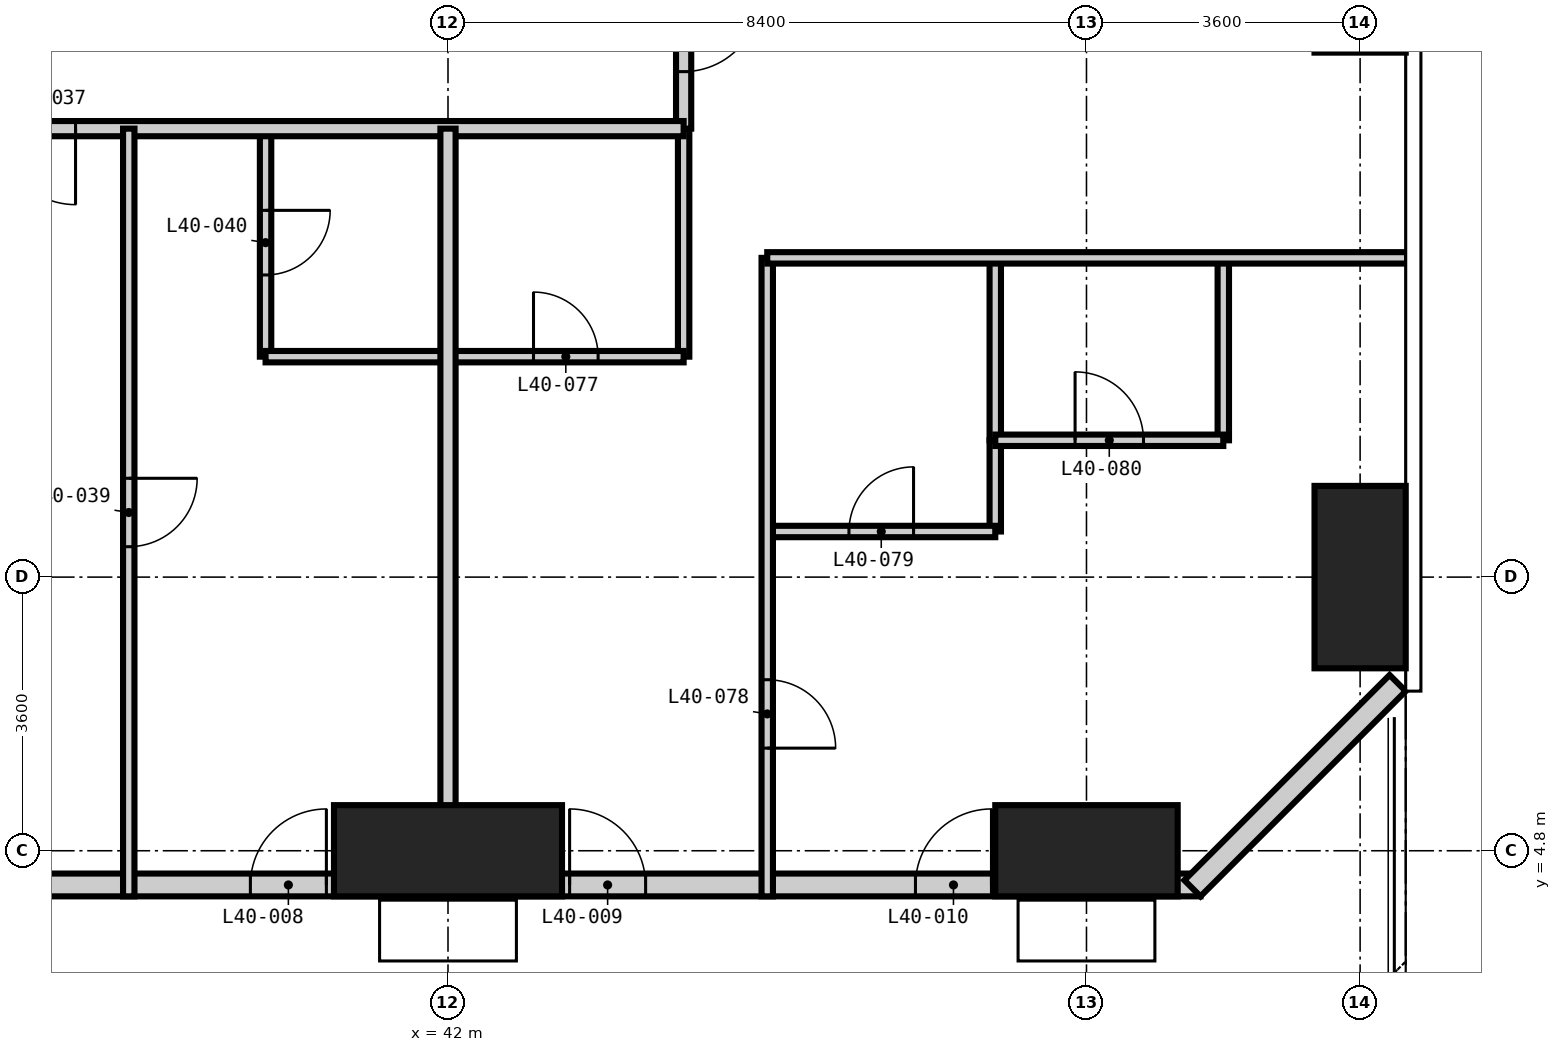
"""IFC4 building model, lengths in metres.
Left out: names, types, materials, properties, quantities, classifications, styles, units other than length and angle.
Written with IfcOpenShell. Run it as: python <this file> out.ifc"""

import sys

from ifc_helpers import new_model, si_unit, direction, frame, frame_2d, origin, origin_2d, place, context, subcontext, project, spatial, rectangle, extrude, element, fill, save


model = new_model("IFC4")
c1 = context("Model", 3, precision=1e-05, world=origin(), true_north=direction((0.0, 1.0)))
c2 = subcontext(c1, "Body", "Model", "MODEL_VIEW")
j1 = project(units=[si_unit("LENGTHUNIT", "METRE"), si_unit("PLANEANGLEUNIT", "RADIAN")], contexts=[c1])
p1 = place(None, origin())
s1 = spatial("IfcSite", under=j1, at=p1, CompositionType="ELEMENT")
p2 = place(p1, origin())
s2 = spatial("IfcBuilding", under=s1, at=p2, CompositionType="ELEMENT")
p3 = place(p2, frame((0.0, 0.0, 159.0)))
s3 = spatial("IfcBuildingStorey", under=s2, at=p3, CompositionType="ELEMENT", Elevation=159.0)
p4 = place(p3, frame((42.0, 4.8, -0.35), z_axis=(0.0, 0.0, 1.0), x_axis=(1.0, 0.0, 0.0)))
e1 = element("IfcColumn", 1, at=p4, inside=s3, PredefinedType="COLUMN", context=c2, shape_type="SweptSolid", body=[
    extrude(rectangle(XDim=3.0, YDim=1.2, at=origin_2d()), origin(), (0.0, 0.0, 1.0), 3.6),
])
p5 = place(p3, frame((50.4, 4.8, -0.35), z_axis=(0.0, 0.0, 1.0), x_axis=(1.0, 0.0, 0.0)))
e2 = element("IfcColumn", 2, at=p5, inside=s3, PredefinedType="COLUMN", context=c2, shape_type="SweptSolid", body=[
    extrude(rectangle(XDim=2.4, YDim=1.2, at=origin_2d()), origin(), (0.0, 0.0, 1.0), 3.6),
])
p6 = place(p3, frame((54.0, 8.4, -0.35), z_axis=(0.0, 0.0, 1.0), x_axis=(1.0, 0.0, 0.0)))
e3 = element("IfcColumn", 3, at=p6, inside=s3, PredefinedType="COLUMN", context=c2, shape_type="SweptSolid", body=[
    extrude(rectangle(XDim=1.2, YDim=2.4, at=origin_2d()), origin(), (0.0, 0.0, 1.0), 3.6),
])
p7 = place(p3, frame((6.9, 4.35, 0.0), z_axis=(0.0, 0.0, 1.0), x_axis=(1.0, 0.0, 0.0)))
e4 = element("IfcWall", 4, at=p7, inside=s3, PredefinedType="SOLIDWALL", context=c2, shape_type="SweptSolid", body=[
    extrude(rectangle(XDim=45.0, YDim=0.3, at=frame_2d((22.5, 0.0))), origin(), (0.0, 0.0, 1.0), 3.25),
])
p8 = place(p7, frame((2.75, 0.0, 0.0)))
e5 = element("IfcOpeningElement", 5, at=p8, cuts=e4, PredefinedType="OPENING", context=c2, shape_type="SweptSolid", body=[
    extrude(rectangle(XDim=1.0, YDim=2.4, at=frame_2d((0.5, 1.2))), frame((0.0, 0.16, 0.0), z_axis=(0.0, -1.0, 0.0), x_axis=(1.0, 0.0, 0.0)), (0.0, 0.0, 1.0), 0.32),
])
p9 = place(p7, frame((7.3, 0.0, 0.0)))
e6 = element("IfcOpeningElement", 6, at=p9, cuts=e4, PredefinedType="OPENING", context=c2, shape_type="SweptSolid", body=[
    extrude(rectangle(XDim=1.0, YDim=2.4, at=frame_2d((0.5, 1.2))), frame((0.0, 0.16, 0.0), z_axis=(0.0, -1.0, 0.0), x_axis=(1.0, 0.0, 0.0)), (0.0, 0.0, 1.0), 0.32),
])
p10 = place(p7, frame((11.5, 0.0, 0.0)))
e7 = element("IfcOpeningElement", 7, at=p10, cuts=e4, PredefinedType="OPENING", context=c2, shape_type="SweptSolid", body=[
    extrude(rectangle(XDim=1.0, YDim=2.4, at=frame_2d((0.5, 1.2))), frame((0.0, 0.16, 0.0), z_axis=(0.0, -1.0, 0.0), x_axis=(1.0, 0.0, 0.0)), (0.0, 0.0, 1.0), 0.32),
])
p11 = place(p7, frame((15.7, 0.0, 0.0)))
e8 = element("IfcOpeningElement", 8, at=p11, cuts=e4, PredefinedType="OPENING", context=c2, shape_type="SweptSolid", body=[
    extrude(rectangle(XDim=1.0, YDim=2.4, at=frame_2d((0.5, 1.2))), frame((0.0, 0.16, 0.0), z_axis=(0.0, -1.0, 0.0), x_axis=(1.0, 0.0, 0.0)), (0.0, 0.0, 1.0), 0.32),
])
p12 = place(p7, frame((19.9, 0.0, 0.0)))
e9 = element("IfcOpeningElement", 9, at=p12, cuts=e4, PredefinedType="OPENING", context=c2, shape_type="SweptSolid", body=[
    extrude(rectangle(XDim=1.0, YDim=2.4, at=frame_2d((0.5, 1.2))), frame((0.0, 0.16, 0.0), z_axis=(0.0, -1.0, 0.0), x_axis=(1.0, 0.0, 0.0)), (0.0, 0.0, 1.0), 0.32),
])
p13 = place(p7, frame((24.1, 0.0, 0.0)))
e10 = element("IfcOpeningElement", 10, at=p13, cuts=e4, PredefinedType="OPENING", context=c2, shape_type="SweptSolid", body=[
    extrude(rectangle(XDim=1.0, YDim=2.4, at=frame_2d((0.5, 1.2))), frame((0.0, 0.16, 0.0), z_axis=(0.0, -1.0, 0.0), x_axis=(1.0, 0.0, 0.0)), (0.0, 0.0, 1.0), 0.32),
])
p14 = place(p7, frame((28.3, 0.0, 0.0)))
e11 = element("IfcOpeningElement", 11, at=p14, cuts=e4, PredefinedType="OPENING", context=c2, shape_type="SweptSolid", body=[
    extrude(rectangle(XDim=1.0, YDim=2.4, at=frame_2d((0.5, 1.2))), frame((0.0, 0.16, 0.0), z_axis=(0.0, -1.0, 0.0), x_axis=(1.0, 0.0, 0.0)), (0.0, 0.0, 1.0), 0.32),
])
p15 = place(p7, frame((32.5, 0.0, 0.0)))
e12 = element("IfcOpeningElement", 12, at=p15, cuts=e4, PredefinedType="OPENING", context=c2, shape_type="SweptSolid", body=[
    extrude(rectangle(XDim=1.0, YDim=2.4, at=frame_2d((0.5, 1.2))), frame((0.0, 0.16, 0.0), z_axis=(0.0, -1.0, 0.0), x_axis=(1.0, 0.0, 0.0)), (0.0, 0.0, 1.0), 0.32),
])
p16 = place(p7, frame((36.7, 0.0, 0.0)))
e13 = element("IfcOpeningElement", 13, at=p16, cuts=e4, PredefinedType="OPENING", context=c2, shape_type="SweptSolid", body=[
    extrude(rectangle(XDim=1.0, YDim=2.4, at=frame_2d((0.5, 1.2))), frame((0.0, 0.16, 0.0), z_axis=(0.0, -1.0, 0.0), x_axis=(1.0, 0.0, 0.0)), (0.0, 0.0, 1.0), 0.32),
])
p17 = place(p7, frame((41.25, 0.0, 0.0)))
e14 = element("IfcOpeningElement", 14, at=p17, cuts=e4, PredefinedType="OPENING", context=c2, shape_type="SweptSolid", body=[
    extrude(rectangle(XDim=1.0, YDim=2.4, at=frame_2d((0.5, 1.2))), frame((0.0, 0.16, 0.0), z_axis=(0.0, -1.0, 0.0), x_axis=(1.0, 0.0, 0.0)), (0.0, 0.0, 1.0), 0.32),
])
p18 = place(p3, frame((51.794, 4.306, 0.0), z_axis=(0.0, 0.0, 1.0), x_axis=(0.707074812166, 0.707138748762, 0.0)))
e15 = element("IfcWall", 15, at=p18, inside=s3, PredefinedType="SOLIDWALL", context=c2, shape_type="SweptSolid", body=[
    extrude(rectangle(XDim=3.818, YDim=0.3, at=frame_2d((1.909, 0.0))), origin(), (0.0, 0.0, 1.0), 3.25),
])
p19 = place(p3, frame((39.6, 11.3, 0.0), z_axis=(0.0, 0.0, 1.0), x_axis=(0.0, 1.0, 0.0)))
e16 = element("IfcWall", 16, at=p19, inside=s3, PredefinedType="PARTITIONING", context=c2, shape_type="SweptSolid", body=[
    extrude(rectangle(XDim=3.0, YDim=0.15, at=frame_2d((1.5, 0.0))), origin(), (0.0, 0.0, 1.0), 3.25),
])
p20 = place(p19, frame((1.075, 0.0, 0.0)))
e17 = element("IfcOpeningElement", 17, at=p20, cuts=e16, PredefinedType="OPENING", context=c2, shape_type="SweptSolid", body=[
    extrude(rectangle(XDim=0.85, YDim=2.1, at=frame_2d((0.425, 1.05))), frame((0.0, 0.085, 0.0), z_axis=(0.0, -1.0, 0.0), x_axis=(1.0, 0.0, 0.0)), (0.0, 0.0, 1.0), 0.17),
])
p21 = place(p3, frame((45.1, 11.3, 0.0), z_axis=(0.0, 0.0, 1.0), x_axis=(0.0, 1.0, 0.0)))
e18 = element("IfcWall", 18, at=p21, inside=s3, PredefinedType="PARTITIONING", context=c2, shape_type="SweptSolid", body=[
    extrude(rectangle(XDim=3.0, YDim=0.15, at=frame_2d((1.5, 0.0))), origin(), (0.0, 0.0, 1.0), 3.25),
])
p22 = place(p3, frame((49.2, 9.0, 0.0), z_axis=(0.0, 0.0, 1.0), x_axis=(0.0, 1.0, 0.0)))
e19 = element("IfcWall", 19, at=p22, inside=s3, PredefinedType="PARTITIONING", context=c2, shape_type="SweptSolid", body=[
    extrude(rectangle(XDim=1.2, YDim=0.15, at=frame_2d((0.6, 0.0))), origin(), (0.0, 0.0, 1.0), 3.25),
])
p23 = place(p3, frame((46.2, 9.0, 0.0), z_axis=(0.0, 0.0, 1.0), x_axis=(1.0, 0.0, 0.0)))
e20 = element("IfcWall", 20, at=p23, inside=s3, PredefinedType="PARTITIONING", context=c2, shape_type="SweptSolid", body=[
    extrude(rectangle(XDim=3.0, YDim=0.15, at=frame_2d((1.5, 0.0))), origin(), (0.0, 0.0, 1.0), 3.25),
])
p24 = place(p23, frame((1.075, 0.0, 0.0)))
e21 = element("IfcOpeningElement", 21, at=p24, cuts=e20, PredefinedType="OPENING", context=c2, shape_type="SweptSolid", body=[
    extrude(rectangle(XDim=0.85, YDim=2.1, at=frame_2d((0.425, 1.05))), frame((0.0, 0.085, 0.0), z_axis=(0.0, -1.0, 0.0), x_axis=(1.0, 0.0, 0.0)), (0.0, 0.0, 1.0), 0.17),
])
p25 = place(p3, frame((39.6, 11.3, 0.0), z_axis=(0.0, 0.0, 1.0), x_axis=(1.0, 0.0, 0.0)))
e22 = element("IfcWall", 22, at=p25, inside=s3, PredefinedType="PARTITIONING", context=c2, shape_type="SweptSolid", body=[
    extrude(rectangle(XDim=5.5, YDim=0.15, at=frame_2d((2.75, 0.0))), origin(), (0.0, 0.0, 1.0), 3.25),
])
p26 = place(p25, frame((3.525, 0.0, 0.0)))
e23 = element("IfcOpeningElement", 23, at=p26, cuts=e22, PredefinedType="OPENING", context=c2, shape_type="SweptSolid", body=[
    extrude(rectangle(XDim=0.85, YDim=2.1, at=frame_2d((0.425, 1.05))), frame((0.0, 0.085, 0.0), z_axis=(0.0, -1.0, 0.0), x_axis=(1.0, 0.0, 0.0)), (0.0, 0.0, 1.0), 0.17),
])
p27 = place(p3, frame((45.1, 45.7, 0.0), z_axis=(0.0, 0.0, 1.0), x_axis=(0.0, -1.0, 0.0)))
e24 = element("IfcWall", 24, at=p27, inside=s3, PredefinedType="PARTITIONING", context=c2, shape_type="SweptSolid", body=[
    extrude(rectangle(XDim=31.4, YDim=0.2, at=frame_2d((15.7, 0.0))), origin(), (0.0, 0.0, 1.0), 3.25),
])
p28 = place(p27, frame((25.1, 0.0, 0.0)))
e25 = element("IfcOpeningElement", 25, at=p28, cuts=e24, PredefinedType="OPENING", context=c2, shape_type="SweptSolid", body=[
    extrude(rectangle(XDim=1.0, YDim=2.2, at=frame_2d((0.5, 1.1))), frame((0.0, 0.11, 0.0), z_axis=(0.0, -1.0, 0.0), x_axis=(1.0, 0.0, 0.0)), (0.0, 0.0, 1.0), 0.22),
])
p29 = place(p27, frame((23.3, 0.0, 0.0)))
e26 = element("IfcOpeningElement", 26, at=p29, cuts=e24, PredefinedType="OPENING", context=c2, shape_type="SweptSolid", body=[
    extrude(rectangle(XDim=1.0, YDim=2.2, at=frame_2d((0.5, 1.1))), frame((0.0, 0.11, 0.0), z_axis=(0.0, -1.0, 0.0), x_axis=(1.0, 0.0, 0.0)), (0.0, 0.0, 1.0), 0.22),
])
p30 = place(p27, frame((16.7, 0.0, 0.0)))
e27 = element("IfcOpeningElement", 27, at=p30, cuts=e24, PredefinedType="OPENING", context=c2, shape_type="SweptSolid", body=[
    extrude(rectangle(XDim=1.0, YDim=2.2, at=frame_2d((0.5, 1.1))), frame((0.0, 0.11, 0.0), z_axis=(0.0, -1.0, 0.0), x_axis=(1.0, 0.0, 0.0)), (0.0, 0.0, 1.0), 0.22),
])
p31 = place(p27, frame((14.9, 0.0, 0.0)))
e28 = element("IfcOpeningElement", 28, at=p31, cuts=e24, PredefinedType="OPENING", context=c2, shape_type="SweptSolid", body=[
    extrude(rectangle(XDim=1.0, YDim=2.2, at=frame_2d((0.5, 1.1))), frame((0.0, 0.11, 0.0), z_axis=(0.0, -1.0, 0.0), x_axis=(1.0, 0.0, 0.0)), (0.0, 0.0, 1.0), 0.22),
])
p32 = place(p27, frame((8.3, 0.0, 0.0)))
e29 = element("IfcOpeningElement", 29, at=p32, cuts=e24, PredefinedType="OPENING", context=c2, shape_type="SweptSolid", body=[
    extrude(rectangle(XDim=1.0, YDim=2.2, at=frame_2d((0.5, 1.1))), frame((0.0, 0.11, 0.0), z_axis=(0.0, -1.0, 0.0), x_axis=(1.0, 0.0, 0.0)), (0.0, 0.0, 1.0), 0.22),
])
p33 = place(p27, frame((6.5, 0.0, 0.0)))
e30 = element("IfcOpeningElement", 30, at=p33, cuts=e24, PredefinedType="OPENING", context=c2, shape_type="SweptSolid", body=[
    extrude(rectangle(XDim=1.0, YDim=2.2, at=frame_2d((0.5, 1.1))), frame((0.0, 0.11, 0.0), z_axis=(0.0, -1.0, 0.0), x_axis=(1.0, 0.0, 0.0)), (0.0, 0.0, 1.0), 0.22),
])
p34 = place(p27, frame((29.65, 0.0, 0.0)))
e31 = element("IfcOpeningElement", 31, at=p34, cuts=e24, PredefinedType="OPENING", context=c2, shape_type="SweptSolid", body=[
    extrude(rectangle(XDim=1.0, YDim=2.2, at=frame_2d((0.5, 1.1))), frame((0.0, 0.11, 0.0), z_axis=(0.0, -1.0, 0.0), x_axis=(1.0, 0.0, 0.0)), (0.0, 0.0, 1.0), 0.22),
])
p35 = place(p27, frame((1.35, 0.0, 0.0)))
e32 = element("IfcOpeningElement", 32, at=p35, cuts=e24, PredefinedType="OPENING", context=c2, shape_type="SweptSolid", body=[
    extrude(rectangle(XDim=1.0, YDim=2.2, at=frame_2d((0.5, 1.1))), frame((0.0, 0.11, 0.0), z_axis=(0.0, -1.0, 0.0), x_axis=(1.0, 0.0, 0.0)), (0.0, 0.0, 1.0), 0.22),
])
p36 = place(p3, frame((45.1, 14.3, 0.0), z_axis=(0.0, 0.0, 1.0), x_axis=(-1.0, 0.0, 0.0)))
e33 = element("IfcWall", 33, at=p36, inside=s3, PredefinedType="PARTITIONING", context=c2, shape_type="SweptSolid", body=[
    extrude(rectangle(XDim=30.8, YDim=0.2, at=frame_2d((15.4, 0.0))), origin(), (0.0, 0.0, 1.0), 3.25),
])
p37 = place(p36, frame((24.8, 0.0, 0.0)))
e34 = element("IfcOpeningElement", 34, at=p37, cuts=e33, PredefinedType="OPENING", context=c2, shape_type="SweptSolid", body=[
    extrude(rectangle(XDim=1.0, YDim=2.2, at=frame_2d((0.5, 1.1))), frame((0.0, 0.11, 0.0), z_axis=(0.0, -1.0, 0.0), x_axis=(1.0, 0.0, 0.0)), (0.0, 0.0, 1.0), 0.22),
])
p38 = place(p36, frame((14.0, 0.0, 0.0)))
e35 = element("IfcOpeningElement", 35, at=p38, cuts=e33, PredefinedType="OPENING", context=c2, shape_type="SweptSolid", body=[
    extrude(rectangle(XDim=1.0, YDim=2.2, at=frame_2d((0.5, 1.1))), frame((0.0, 0.11, 0.0), z_axis=(0.0, -1.0, 0.0), x_axis=(1.0, 0.0, 0.0)), (0.0, 0.0, 1.0), 0.22),
])
p39 = place(p36, frame((8.0, 0.0, 0.0)))
e36 = element("IfcOpeningElement", 36, at=p39, cuts=e33, PredefinedType="OPENING", context=c2, shape_type="SweptSolid", body=[
    extrude(rectangle(XDim=1.0, YDim=2.2, at=frame_2d((0.5, 1.1))), frame((0.0, 0.11, 0.0), z_axis=(0.0, -1.0, 0.0), x_axis=(1.0, 0.0, 0.0)), (0.0, 0.0, 1.0), 0.22),
])
p40 = place(p3, frame((42.0, 4.2, 0.0), z_axis=(0.0, 0.0, 1.0), x_axis=(0.0, 1.0, 0.0)))
e37 = element("IfcWall", 37, at=p40, inside=s3, PredefinedType="PARTITIONING", context=c2, shape_type="SweptSolid", body=[
    extrude(rectangle(XDim=10.1, YDim=0.2, at=frame_2d((5.05, 0.0))), origin(), (0.0, 0.0, 1.0), 3.25),
])
p41 = place(p3, frame((37.8, 4.2, 0.0), z_axis=(0.0, 0.0, 1.0), x_axis=(0.0, 1.0, 0.0)))
e38 = element("IfcWall", 38, at=p41, inside=s3, PredefinedType="PARTITIONING", context=c2, shape_type="SweptSolid", body=[
    extrude(rectangle(XDim=10.1, YDim=0.15, at=frame_2d((5.05, 0.0))), origin(), (0.0, 0.0, 1.0), 3.25),
])
p42 = place(p41, frame((4.6, 0.0, 0.0)))
e39 = element("IfcOpeningElement", 39, at=p42, cuts=e38, PredefinedType="OPENING", context=c2, shape_type="SweptSolid", body=[
    extrude(rectangle(XDim=0.9, YDim=2.1, at=frame_2d((0.45, 1.05))), frame((0.0, 0.085, 0.0), z_axis=(0.0, -1.0, 0.0), x_axis=(1.0, 0.0, 0.0)), (0.0, 0.0, 1.0), 0.17),
])
p43 = place(p3, frame((46.2, 4.2, 0.0), z_axis=(0.0, 0.0, 1.0), x_axis=(0.0, 1.0, 0.0)))
e40 = element("IfcWall", 40, at=p43, inside=s3, PredefinedType="PARTITIONING", context=c2, shape_type="SweptSolid", body=[
    extrude(rectangle(XDim=8.4, YDim=0.15, at=frame_2d((4.2, 0.0))), origin(), (0.0, 0.0, 1.0), 3.25),
])
p44 = place(p43, frame((1.95, 0.0, 0.0)))
e41 = element("IfcOpeningElement", 41, at=p44, cuts=e40, PredefinedType="OPENING", context=c2, shape_type="SweptSolid", body=[
    extrude(rectangle(XDim=0.9, YDim=2.1, at=frame_2d((0.45, 1.05))), frame((0.0, 0.085, 0.0), z_axis=(0.0, -1.0, 0.0), x_axis=(1.0, 0.0, 0.0)), (0.0, 0.0, 1.0), 0.17),
])
for number, where, z_axis, x_axis in (
    (42, (49.2, 10.2, 0.0), (0.0, 0.0, 1.0), (0.0, 1.0, 0.0)),
    (43, (52.2, 10.2, 0.0), (0.0, 0.0, 1.0), (0.0, 1.0, 0.0)),
):
    element("IfcWall", number, at=place(p3, frame(where, z_axis=z_axis, x_axis=x_axis)), inside=s3, PredefinedType="PARTITIONING", context=c2, shape_type="SweptSolid", body=[
        extrude(rectangle(XDim=2.4, YDim=0.15, at=frame_2d((1.2, 0.0))), origin(), (0.0, 0.0, 1.0), 3.25),
    ])
p45 = place(p3, frame((49.2, 10.2, 0.0), z_axis=(0.0, 0.0, 1.0), x_axis=(1.0, 0.0, 0.0)))
e44 = element("IfcWall", 44, at=p45, inside=s3, PredefinedType="PARTITIONING", context=c2, shape_type="SweptSolid", body=[
    extrude(rectangle(XDim=3.0, YDim=0.15, at=frame_2d((1.5, 0.0))), origin(), (0.0, 0.0, 1.0), 3.25),
])
p46 = place(p45, frame((1.05, 0.0, 0.0)))
e45 = element("IfcOpeningElement", 45, at=p46, cuts=e44, PredefinedType="OPENING", context=c2, shape_type="SweptSolid", body=[
    extrude(rectangle(XDim=0.9, YDim=2.1, at=frame_2d((0.45, 1.05))), frame((0.0, 0.085, 0.0), z_axis=(0.0, -1.0, 0.0), x_axis=(1.0, 0.0, 0.0)), (0.0, 0.0, 1.0), 0.17),
])
p47 = place(p3, frame((46.2, 12.6, 0.0), z_axis=(0.0, 0.0, 1.0), x_axis=(1.0, 0.0, 0.0)))
e46 = element("IfcWall", 46, at=p47, inside=s3, PredefinedType="PARTITIONING", context=c2, shape_type="SweptSolid", body=[
    extrude(rectangle(XDim=8.418, YDim=0.15, at=frame_2d((4.209, 0.0))), origin(), (0.0, 0.0, 1.0), 3.25),
])
p48 = place(p15, origin())
e47 = element("IfcDoor", 47, at=p48, inside=s3, OperationType="SINGLE_SWING_RIGHT", PredefinedType="DOOR", context=c2, shape_type="SweptSolid", body=[
    extrude(rectangle(XDim=1.0, YDim=2.4, at=frame_2d((0.5, 1.2))), frame((0.0, 0.025, 0.0), z_axis=(0.0, -1.0, 0.0), x_axis=(1.0, 0.0, 0.0)), (0.0, 0.0, 1.0), 0.05),
])
fill(e12, e47)
p49 = place(p16, origin())
e48 = element("IfcDoor", 48, at=p49, inside=s3, OperationType="SINGLE_SWING_LEFT", PredefinedType="DOOR", context=c2, shape_type="SweptSolid", body=[
    extrude(rectangle(XDim=1.0, YDim=2.4, at=frame_2d((0.5, 1.2))), frame((0.0, 0.025, 0.0), z_axis=(0.0, -1.0, 0.0), x_axis=(1.0, 0.0, 0.0)), (0.0, 0.0, 1.0), 0.05),
])
fill(e13, e48)
p50 = place(p17, origin())
e49 = element("IfcDoor", 49, at=p50, inside=s3, OperationType="SINGLE_SWING_RIGHT", PredefinedType="DOOR", context=c2, shape_type="SweptSolid", body=[
    extrude(rectangle(XDim=1.0, YDim=2.4, at=frame_2d((0.5, 1.2))), frame((0.0, 0.025, 0.0), z_axis=(0.0, -1.0, 0.0), x_axis=(1.0, 0.0, 0.0)), (0.0, 0.0, 1.0), 0.05),
])
fill(e14, e49)
p51 = place(p39, origin())
e50 = element("IfcDoor", 50, at=p51, inside=s3, OperationType="SINGLE_SWING_LEFT", PredefinedType="DOOR", context=c2, shape_type="SweptSolid", body=[
    extrude(rectangle(XDim=1.0, YDim=2.2, at=frame_2d((0.5, 1.1))), frame((0.0, 0.025, 0.0), z_axis=(0.0, -1.0, 0.0), x_axis=(1.0, 0.0, 0.0)), (0.0, 0.0, 1.0), 0.05),
])
fill(e36, e50)
p52 = place(p42, frame((0.9, 0.0, 0.0), z_axis=(0.0, 0.0, 1.0), x_axis=(-1.0, 0.0, 0.0)))
e51 = element("IfcDoor", 51, at=p52, inside=s3, OperationType="SINGLE_SWING_LEFT", PredefinedType="DOOR", context=c2, shape_type="SweptSolid", body=[
    extrude(rectangle(XDim=0.9, YDim=2.1, at=frame_2d((0.45, 1.05))), frame((0.0, 0.025, 0.0), z_axis=(0.0, -1.0, 0.0), x_axis=(1.0, 0.0, 0.0)), (0.0, 0.0, 1.0), 0.05),
])
fill(e39, e51)
p53 = place(p20, frame((0.85, 0.0, 0.0), z_axis=(0.0, 0.0, 1.0), x_axis=(-1.0, 0.0, 0.0)))
e52 = element("IfcDoor", 52, at=p53, inside=s3, OperationType="SINGLE_SWING_LEFT", PredefinedType="DOOR", context=c2, shape_type="SweptSolid", body=[
    extrude(rectangle(XDim=0.85, YDim=2.1, at=frame_2d((0.425, 1.05))), frame((0.0, 0.025, 0.0), z_axis=(0.0, -1.0, 0.0), x_axis=(1.0, 0.0, 0.0)), (0.0, 0.0, 1.0), 0.05),
])
fill(e17, e52)
p54 = place(p34, origin())
e53 = element("IfcDoor", 53, at=p54, inside=s3, OperationType="SINGLE_SWING_LEFT", PredefinedType="DOOR", context=c2, shape_type="SweptSolid", body=[
    extrude(rectangle(XDim=1.0, YDim=2.2, at=frame_2d((0.5, 1.1))), frame((0.0, 0.025, 0.0), z_axis=(0.0, -1.0, 0.0), x_axis=(1.0, 0.0, 0.0)), (0.0, 0.0, 1.0), 0.05),
])
fill(e31, e53)
p55 = place(p26, origin())
e54 = element("IfcDoor", 54, at=p55, inside=s3, OperationType="SINGLE_SWING_LEFT", PredefinedType="DOOR", context=c2, shape_type="SweptSolid", body=[
    extrude(rectangle(XDim=0.85, YDim=2.1, at=frame_2d((0.425, 1.05))), frame((0.0, 0.025, 0.0), z_axis=(0.0, -1.0, 0.0), x_axis=(1.0, 0.0, 0.0)), (0.0, 0.0, 1.0), 0.05),
])
fill(e23, e54)
p56 = place(p44, frame((0.9, 0.0, 0.0), z_axis=(0.0, 0.0, 1.0), x_axis=(-1.0, 0.0, 0.0)))
e55 = element("IfcDoor", 55, at=p56, inside=s3, OperationType="SINGLE_SWING_RIGHT", PredefinedType="DOOR", context=c2, shape_type="SweptSolid", body=[
    extrude(rectangle(XDim=0.9, YDim=2.1, at=frame_2d((0.45, 1.05))), frame((0.0, 0.025, 0.0), z_axis=(0.0, -1.0, 0.0), x_axis=(1.0, 0.0, 0.0)), (0.0, 0.0, 1.0), 0.05),
])
fill(e41, e55)
p57 = place(p24, origin())
e56 = element("IfcDoor", 56, at=p57, inside=s3, OperationType="SINGLE_SWING_RIGHT", PredefinedType="DOOR", context=c2, shape_type="SweptSolid", body=[
    extrude(rectangle(XDim=0.85, YDim=2.1, at=frame_2d((0.425, 1.05))), frame((0.0, 0.025, 0.0), z_axis=(0.0, -1.0, 0.0), x_axis=(1.0, 0.0, 0.0)), (0.0, 0.0, 1.0), 0.05),
])
fill(e21, e56)
p58 = place(p46, origin())
e57 = element("IfcDoor", 57, at=p58, inside=s3, OperationType="SINGLE_SWING_LEFT", PredefinedType="DOOR", context=c2, shape_type="SweptSolid", body=[
    extrude(rectangle(XDim=0.9, YDim=2.1, at=frame_2d((0.45, 1.05))), frame((0.0, 0.025, 0.0), z_axis=(0.0, -1.0, 0.0), x_axis=(1.0, 0.0, 0.0)), (0.0, 0.0, 1.0), 0.05),
])
fill(e45, e57)
save(model, sys.argv[1])
